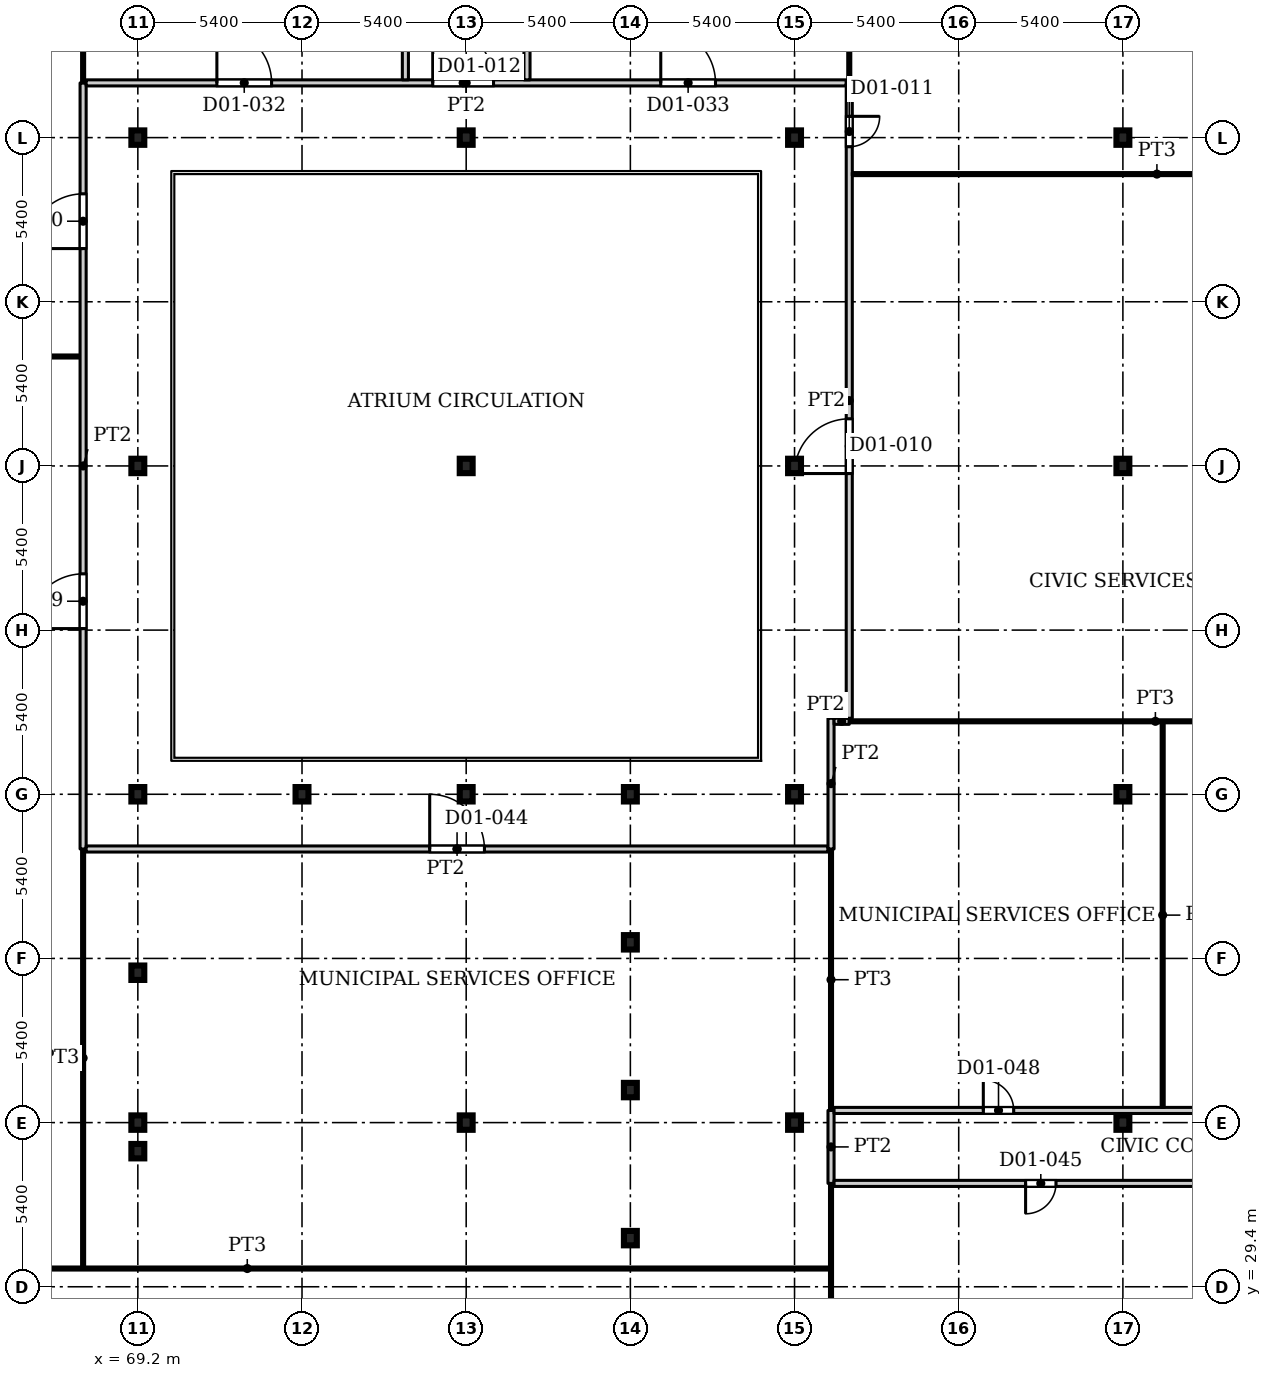
"""IFC4 building model, lengths in metres.
Left out: names, types, materials, properties, quantities, classifications, styles, units other than length and angle.
Written with IfcOpenShell. Run it as: python <this file> out.ifc"""

import sys

from ifc_helpers import new_model, si_unit, direction, frame, frame_2d, origin, origin_2d, place, context, subcontext, project, spatial, rectangle, i_section, extrude, source, transform, mapped, element, fill, save


model = new_model("IFC4")
c1 = context("Model", 3, precision=1e-05, world=origin(), true_north=direction((0.0, 1.0)))
c2 = subcontext(c1, "Body", "Model", "MODEL_VIEW")
j1 = project(units=[si_unit("LENGTHUNIT", "METRE"), si_unit("PLANEANGLEUNIT", "RADIAN")], contexts=[c1])
p1 = place(None, origin())
s1 = spatial("IfcSite", under=j1, at=p1, CompositionType="ELEMENT")
p2 = place(p1, origin())
s2 = spatial("IfcBuilding", under=s1, at=p2, CompositionType="ELEMENT")
p3 = place(p2, frame((0.0, 0.0, 7.5)))
s3 = spatial("IfcBuildingStorey", under=s2, at=p3, CompositionType="ELEMENT", Elevation=7.5)
for number, where, z_axis, x_axis in (
    (1, (69.2, 34.8, 0.0), (0.0, 0.0, 1.0), (1.0, 0.0, 0.0)),
    (2, (80.0, 34.8, 0.0), (0.0, 0.0, 1.0), (1.0, 0.0, 0.0)),
    (3, (90.8, 34.8, 0.0), (0.0, 0.0, 1.0), (1.0, 0.0, 0.0)),
    (4, (101.6, 34.8, 0.0), (0.0, 0.0, 1.0), (1.0, 0.0, 0.0)),
    (5, (69.2, 45.6, 0.0), (0.0, 0.0, 1.0), (1.0, 0.0, 0.0)),
    (6, (80.0, 45.6, 0.0), (0.0, 0.0, 1.0), (1.0, 0.0, 0.0)),
    (7, (90.8, 45.6, 0.0), (0.0, 0.0, 1.0), (1.0, 0.0, 0.0)),
    (8, (101.6, 45.6, 0.0), (0.0, 0.0, 1.0), (1.0, 0.0, 0.0)),
    (9, (69.2, 56.4, 0.0), (0.0, 0.0, 1.0), (1.0, 0.0, 0.0)),
    (10, (80.0, 56.4, 0.0), (0.0, 0.0, 1.0), (1.0, 0.0, 0.0)),
    (11, (90.8, 56.4, 0.0), (0.0, 0.0, 1.0), (1.0, 0.0, 0.0)),
    (12, (101.6, 56.4, 0.0), (0.0, 0.0, 1.0), (1.0, 0.0, 0.0)),
    (13, (69.2, 67.2, 0.0), (0.0, 0.0, 1.0), (1.0, 0.0, 0.0)),
    (14, (80.0, 67.2, 0.0), (0.0, 0.0, 1.0), (1.0, 0.0, 0.0)),
    (15, (90.8, 67.2, 0.0), (0.0, 0.0, 1.0), (1.0, 0.0, 0.0)),
    (16, (101.6, 67.2, 0.0), (0.0, 0.0, 1.0), (1.0, 0.0, 0.0)),
    (17, (74.6, 45.6, 0.0), (0.0, 0.0, 1.0), (1.0, 0.0, 0.0)),
    (18, (85.4, 45.6, 0.0), (0.0, 0.0, 1.0), (1.0, 0.0, 0.0)),
    (19, (85.4, 31.0, 0.0), (0.0, 0.0, 1.0), (1.0, 0.0, 0.0)),
    (20, (69.2, 33.86, 0.0), (0.0, 0.0, 1.0), (1.0, 0.0, 0.0)),
    (21, (85.4, 35.87, 0.0), (0.0, 0.0, 1.0), (1.0, 0.0, 0.0)),
    (22, (69.2, 39.73, 0.0), (0.0, 0.0, 1.0), (1.0, 0.0, 0.0)),
    (23, (85.4, 40.73, 0.0), (0.0, 0.0, 1.0), (1.0, 0.0, 0.0)),
):
    element("IfcColumn", number, at=place(p3, frame(where, z_axis=z_axis, x_axis=x_axis)), inside=s3, PredefinedType="COLUMN", context=c2, shape_type="SweptSolid", body=[
        extrude(i_section(OverallWidth=0.424, OverallDepth=0.474, WebThickness=0.048, FlangeThickness=0.077, FilletRadius=0.014, at=origin_2d()), origin(), (0.0, 0.0, 1.0), 5.0),
    ])
p4 = place(p3, frame((33.45, 60.0, 0.0), z_axis=(0.0, 0.0, 1.0), x_axis=(1.0, 0.0, 0.0)))
e24 = element("IfcWall", 24, at=p4, inside=s3, PredefinedType="PARTITIONING", context=c2, shape_type="SweptSolid", body=[
    extrude(rectangle(XDim=33.85, YDim=0.1, at=frame_2d((16.925, 0.0))), origin(), (0.0, 0.0, 1.0), 4.68),
])
p5 = place(p3, frame((53.649, 30.0, 0.0), z_axis=(0.0, 0.0, 1.0), x_axis=(1.0, 0.0, 0.0)))
e25 = element("IfcWall", 25, at=p5, inside=s3, PredefinedType="PARTITIONING", context=c2, shape_type="SweptSolid", body=[
    extrude(rectangle(XDim=38.301, YDim=0.1, at=frame_2d((19.15, 0.0))), origin(), (0.0, 0.0, 1.0), 4.68),
])
p6 = place(p3, frame((67.4, 30.05, 0.0), z_axis=(0.0, 0.0, 1.0), x_axis=(0.0, 1.0, 0.0)))
e26 = element("IfcWall", 26, at=p6, inside=s3, PredefinedType="PARTITIONING", context=c2, shape_type="SweptSolid", body=[
    extrude(rectangle(XDim=13.75, YDim=0.1, at=frame_2d((6.875, 0.0))), origin(), (0.0, 0.0, 1.0), 4.68),
])
p7 = place(p3, frame((67.4, 43.8, 0.0), z_axis=(0.0, 0.0, 1.0), x_axis=(0.0, 1.0, 0.0)))
e27 = element("IfcWall", 27, at=p7, inside=s3, PredefinedType="PARTITIONING", context=c2, shape_type="SweptSolid", body=[
    extrude(rectangle(XDim=25.2, YDim=0.2, at=frame_2d((12.6, 0.0))), origin(), (0.0, 0.0, 1.0), 4.68),
])
p8 = place(p7, frame((7.25, 0.0, 0.0)))
e28 = element("IfcOpeningElement", 28, at=p8, cuts=e27, PredefinedType="OPENING", context=c2, shape_type="SweptSolid", body=[
    extrude(rectangle(XDim=1.8, YDim=2.1, at=frame_2d((0.9, 1.05))), frame((0.0, 0.11, 0.0), z_axis=(0.0, -1.0, 0.0), x_axis=(1.0, 0.0, 0.0)), (0.0, 0.0, 1.0), 0.22),
])
p9 = place(p7, frame((19.75, 0.0, 0.0)))
e29 = element("IfcOpeningElement", 29, at=p9, cuts=e27, PredefinedType="OPENING", context=c2, shape_type="SweptSolid", body=[
    extrude(rectangle(XDim=1.8, YDim=2.1, at=frame_2d((0.9, 1.05))), frame((0.0, 0.11, 0.0), z_axis=(0.0, -1.0, 0.0), x_axis=(1.0, 0.0, 0.0)), (0.0, 0.0, 1.0), 0.22),
])
p10 = place(p3, frame((67.4, 69.0, 0.0), z_axis=(0.0, 0.0, 1.0), x_axis=(0.0, 1.0, 0.0)))
e30 = element("IfcWall", 30, at=p10, inside=s3, PredefinedType="PARTITIONING", context=c2, shape_type="SweptSolid", body=[
    extrude(rectangle(XDim=21.738, YDim=0.1, at=frame_2d((10.869, 0.0))), origin(), (0.0, 0.0, 1.0), 4.68),
])
p11 = place(p3, frame((67.5, 43.8, 0.0), z_axis=(0.0, 0.0, 1.0), x_axis=(1.0, 0.0, 0.0)))
e31 = element("IfcWall", 31, at=p11, inside=s3, PredefinedType="PARTITIONING", context=c2, shape_type="SweptSolid", body=[
    extrude(rectangle(XDim=24.4, YDim=0.2, at=frame_2d((12.2, 0.0))), origin(), (0.0, 0.0, 1.0), 4.68),
])
p12 = place(p11, frame((11.3, 0.0, 0.0)))
e32 = element("IfcOpeningElement", 32, at=p12, cuts=e31, PredefinedType="OPENING", context=c2, shape_type="SweptSolid", body=[
    extrude(rectangle(XDim=1.8, YDim=2.1, at=frame_2d((0.9, 1.05))), frame((0.0, 0.11, 0.0), z_axis=(0.0, -1.0, 0.0), x_axis=(1.0, 0.0, 0.0)), (0.0, 0.0, 1.0), 0.22),
])
p13 = place(p3, frame((67.5, 69.0, 0.0), z_axis=(0.0, 0.0, 1.0), x_axis=(1.0, 0.0, 0.0)))
e33 = element("IfcWall", 33, at=p13, inside=s3, PredefinedType="PARTITIONING", context=c2, shape_type="SweptSolid", body=[
    extrude(rectangle(XDim=25.0, YDim=0.2, at=frame_2d((12.5, 0.0))), origin(), (0.0, 0.0, 1.0), 4.68),
])
p14 = place(p13, frame((11.4, 0.0, 0.0)))
e34 = element("IfcOpeningElement", 34, at=p14, cuts=e33, PredefinedType="OPENING", context=c2, shape_type="SweptSolid", body=[
    extrude(rectangle(XDim=2.0, YDim=2.1, at=frame_2d((1.0, 1.05))), frame((0.0, 0.11, 0.0), z_axis=(0.0, -1.0, 0.0), x_axis=(1.0, 0.0, 0.0)), (0.0, 0.0, 1.0), 0.22),
])
p15 = place(p13, frame((4.3, 0.0, 0.0)))
e35 = element("IfcOpeningElement", 35, at=p15, cuts=e33, PredefinedType="OPENING", context=c2, shape_type="SweptSolid", body=[
    extrude(rectangle(XDim=1.8, YDim=2.1, at=frame_2d((0.9, 1.05))), frame((0.0, 0.11, 0.0), z_axis=(0.0, -1.0, 0.0), x_axis=(1.0, 0.0, 0.0)), (0.0, 0.0, 1.0), 0.22),
])
p16 = place(p13, frame((18.9, 0.0, 0.0)))
e36 = element("IfcOpeningElement", 36, at=p16, cuts=e33, PredefinedType="OPENING", context=c2, shape_type="SweptSolid", body=[
    extrude(rectangle(XDim=1.8, YDim=2.1, at=frame_2d((0.9, 1.05))), frame((0.0, 0.11, 0.0), z_axis=(0.0, -1.0, 0.0), x_axis=(1.0, 0.0, 0.0)), (0.0, 0.0, 1.0), 0.22),
])
for number, where, z_axis, x_axis in (
    (37, (78.0, 69.1, 0.0), (0.0, 0.0, 1.0), (0.0, 1.0, 0.0)),
    (38, (82.0, 69.1, 0.0), (0.0, 0.0, 1.0), (0.0, 1.0, 0.0)),
):
    element("IfcWall", number, at=place(p3, frame(where, z_axis=z_axis, x_axis=x_axis)), inside=s3, PredefinedType="PARTITIONING", context=c2, shape_type="SweptSolid", body=[
        extrude(rectangle(XDim=21.6, YDim=0.2, at=frame_2d((10.8, 0.0))), origin(), (0.0, 0.0, 1.0), 4.68),
    ])
p17 = place(p3, frame((92.0, 22.05, 0.0), z_axis=(0.0, 0.0, 1.0), x_axis=(0.0, 1.0, 0.0)))
e39 = element("IfcWall", 39, at=p17, inside=s3, PredefinedType="PARTITIONING", context=c2, shape_type="SweptSolid", body=[
    extrude(rectangle(XDim=10.75, YDim=0.1, at=frame_2d((5.375, 0.0))), origin(), (0.0, 0.0, 1.0), 4.68),
])
p18 = place(p3, frame((92.0, 32.8, 0.0), z_axis=(0.0, 0.0, 1.0), x_axis=(0.0, 1.0, 0.0)))
e40 = element("IfcWall", 40, at=p18, inside=s3, PredefinedType="PARTITIONING", context=c2, shape_type="SweptSolid", body=[
    extrude(rectangle(XDim=2.4, YDim=0.2, at=frame_2d((1.2, 0.0))), origin(), (0.0, 0.0, 1.0), 4.68),
])
p19 = place(p3, frame((92.0, 35.2, 0.0), z_axis=(0.0, 0.0, 1.0), x_axis=(0.0, 1.0, 0.0)))
e41 = element("IfcWall", 41, at=p19, inside=s3, PredefinedType="PARTITIONING", context=c2, shape_type="SweptSolid", body=[
    extrude(rectangle(XDim=8.6, YDim=0.1, at=frame_2d((4.3, 0.0))), origin(), (0.0, 0.0, 1.0), 4.68),
])
p20 = place(p3, frame((92.0, 43.8, 0.0), z_axis=(0.0, 0.0, 1.0), x_axis=(0.0, 1.0, 0.0)))
e42 = element("IfcWall", 42, at=p20, inside=s3, PredefinedType="PARTITIONING", context=c2, shape_type="SweptSolid", body=[
    extrude(rectangle(XDim=4.3, YDim=0.2, at=frame_2d((2.15, 0.0))), origin(), (0.0, 0.0, 1.0), 4.68),
])
p21 = place(p3, frame((92.1, 32.8, 0.0), z_axis=(0.0, 0.0, 1.0), x_axis=(1.0, 0.0, 0.0)))
e43 = element("IfcWall", 43, at=p21, inside=s3, PredefinedType="PARTITIONING", context=c2, shape_type="SweptSolid", body=[
    extrude(rectangle(XDim=32.881, YDim=0.2, at=frame_2d((16.44, 0.0))), origin(), (0.0, 0.0, 1.0), 4.68),
])
p22 = place(p21, frame((6.3, 0.0, 0.0)))
e44 = element("IfcOpeningElement", 44, at=p22, cuts=e43, PredefinedType="OPENING", context=c2, shape_type="SweptSolid", body=[
    extrude(rectangle(XDim=1.0, YDim=2.1, at=frame_2d((0.5, 1.05))), frame((0.0, 0.11, 0.0), z_axis=(0.0, -1.0, 0.0), x_axis=(1.0, 0.0, 0.0)), (0.0, 0.0, 1.0), 0.22),
])
p23 = place(p21, frame((19.3, 0.0, 0.0)))
e45 = element("IfcOpeningElement", 45, at=p23, cuts=e43, PredefinedType="OPENING", context=c2, shape_type="SweptSolid", body=[
    extrude(rectangle(XDim=1.0, YDim=2.1, at=frame_2d((0.5, 1.05))), frame((0.0, 0.11, 0.0), z_axis=(0.0, -1.0, 0.0), x_axis=(1.0, 0.0, 0.0)), (0.0, 0.0, 1.0), 0.22),
])
p24 = place(p21, frame((29.05, 0.0, 0.0)))
e46 = element("IfcOpeningElement", 46, at=p24, cuts=e43, PredefinedType="OPENING", context=c2, shape_type="SweptSolid", body=[
    extrude(rectangle(XDim=1.0, YDim=2.1, at=frame_2d((0.5, 1.05))), frame((0.0, 0.11, 0.0), z_axis=(0.0, -1.0, 0.0), x_axis=(1.0, 0.0, 0.0)), (0.0, 0.0, 1.0), 0.22),
])
p25 = place(p3, frame((92.1, 35.2, 0.0), z_axis=(0.0, 0.0, 1.0), x_axis=(1.0, 0.0, 0.0)))
e47 = element("IfcWall", 47, at=p25, inside=s3, PredefinedType="PARTITIONING", context=c2, shape_type="SweptSolid", body=[
    extrude(rectangle(XDim=32.88, YDim=0.2, at=frame_2d((16.44, 0.0))), origin(), (0.0, 0.0, 1.0), 4.68),
])
p26 = place(p25, frame((4.909, 0.0, 0.0)))
e48 = element("IfcOpeningElement", 48, at=p26, cuts=e47, PredefinedType="OPENING", context=c2, shape_type="SweptSolid", body=[
    extrude(rectangle(XDim=1.0, YDim=2.1, at=frame_2d((0.5, 1.05))), frame((0.0, 0.11, 0.0), z_axis=(0.0, -1.0, 0.0), x_axis=(1.0, 0.0, 0.0)), (0.0, 0.0, 1.0), 0.22),
])
p27 = place(p25, frame((13.932, 0.0, 0.0)))
e49 = element("IfcOpeningElement", 49, at=p27, cuts=e47, PredefinedType="OPENING", context=c2, shape_type="SweptSolid", body=[
    extrude(rectangle(XDim=1.0, YDim=2.1, at=frame_2d((0.5, 1.05))), frame((0.0, 0.11, 0.0), z_axis=(0.0, -1.0, 0.0), x_axis=(1.0, 0.0, 0.0)), (0.0, 0.0, 1.0), 0.22),
])
p28 = place(p25, frame((23.091, 0.0, 0.0)))
e50 = element("IfcOpeningElement", 50, at=p28, cuts=e47, PredefinedType="OPENING", context=c2, shape_type="SweptSolid", body=[
    extrude(rectangle(XDim=1.0, YDim=2.1, at=frame_2d((0.5, 1.05))), frame((0.0, 0.11, 0.0), z_axis=(0.0, -1.0, 0.0), x_axis=(1.0, 0.0, 0.0)), (0.0, 0.0, 1.0), 0.22),
])
p29 = place(p25, frame((29.477, 0.0, 0.0)))
e51 = element("IfcOpeningElement", 51, at=p29, cuts=e47, PredefinedType="OPENING", context=c2, shape_type="SweptSolid", body=[
    extrude(rectangle(XDim=1.0, YDim=2.1, at=frame_2d((0.5, 1.05))), frame((0.0, 0.11, 0.0), z_axis=(0.0, -1.0, 0.0), x_axis=(1.0, 0.0, 0.0)), (0.0, 0.0, 1.0), 0.22),
])
p30 = place(p3, frame((92.1, 48.0, 0.0), z_axis=(0.0, 0.0, 1.0), x_axis=(1.0, 0.0, 0.0)))
e52 = element("IfcWall", 52, at=p30, inside=s3, PredefinedType="PARTITIONING", context=c2, shape_type="SweptSolid", body=[
    extrude(rectangle(XDim=0.5, YDim=0.2, at=frame_2d((0.25, 0.0))), origin(), (0.0, 0.0, 1.0), 4.68),
])
p31 = place(p3, frame((92.6, 48.0, 0.0), z_axis=(0.0, 0.0, 1.0), x_axis=(1.0, 0.0, 0.0)))
e53 = element("IfcWall", 53, at=p31, inside=s3, PredefinedType="PARTITIONING", context=c2, shape_type="SweptSolid", body=[
    extrude(rectangle(XDim=20.138, YDim=0.1, at=frame_2d((10.069, 0.0))), origin(), (0.0, 0.0, 1.0), 4.68),
])
p32 = place(p3, frame((92.6, 48.1, 0.0), z_axis=(0.0, 0.0, 1.0), x_axis=(0.0, 1.0, 0.0)))
e54 = element("IfcWall", 54, at=p32, inside=s3, PredefinedType="PARTITIONING", context=c2, shape_type="SweptSolid", body=[
    extrude(rectangle(XDim=20.9, YDim=0.2, at=frame_2d((10.45, 0.0))), origin(), (0.0, 0.0, 1.0), 4.68),
])
p33 = place(p32, frame((8.05, 0.0, 0.0)))
e55 = element("IfcOpeningElement", 55, at=p33, cuts=e54, PredefinedType="OPENING", context=c2, shape_type="SweptSolid", body=[
    extrude(rectangle(XDim=1.8, YDim=2.1, at=frame_2d((0.9, 1.05))), frame((0.0, 0.11, 0.0), z_axis=(0.0, -1.0, 0.0), x_axis=(1.0, 0.0, 0.0)), (0.0, 0.0, 1.0), 0.22),
])
p34 = place(p32, frame((18.8, 0.0, 0.0)))
e56 = element("IfcOpeningElement", 56, at=p34, cuts=e54, PredefinedType="OPENING", context=c2, shape_type="SweptSolid", body=[
    extrude(rectangle(XDim=1.0, YDim=2.1, at=frame_2d((0.5, 1.05))), frame((0.0, 0.11, 0.0), z_axis=(0.0, -1.0, 0.0), x_axis=(1.0, 0.0, 0.0)), (0.0, 0.0, 1.0), 0.22),
])
p35 = place(p3, frame((92.6, 69.0, 0.0), z_axis=(0.0, 0.0, 1.0), x_axis=(0.0, 1.0, 0.0)))
e57 = element("IfcWall", 57, at=p35, inside=s3, PredefinedType="PARTITIONING", context=c2, shape_type="SweptSolid", body=[
    extrude(rectangle(XDim=21.738, YDim=0.1, at=frame_2d((10.869, 0.0))), origin(), (0.0, 0.0, 1.0), 4.68),
])
p36 = place(p3, frame((92.7, 66.0, 0.0), z_axis=(0.0, 0.0, 1.0), x_axis=(1.0, 0.0, 0.0)))
e58 = element("IfcWall", 58, at=p36, inside=s3, PredefinedType="PARTITIONING", context=c2, shape_type="SweptSolid", body=[
    extrude(rectangle(XDim=20.038, YDim=0.1, at=frame_2d((10.019, 0.0))), origin(), (0.0, 0.0, 1.0), 4.68),
])
p37 = place(p3, frame((102.909, 35.3, 0.0), z_axis=(0.0, 0.0, 1.0), x_axis=(0.0, 1.0, 0.0)))
e59 = element("IfcWall", 59, at=p37, inside=s3, PredefinedType="PARTITIONING", context=c2, shape_type="SweptSolid", body=[
    extrude(rectangle(XDim=12.65, YDim=0.1, at=frame_2d((6.325, 0.0))), origin(), (0.0, 0.0, 1.0), 4.68),
])
m1 = source(origin(), c2, "Body", "SweptSolid", [
    extrude(rectangle(XDim=1.8, YDim=2.1, at=frame_2d((0.9, 1.05))), frame((0.0, 0.025, 0.0), z_axis=(0.0, -1.0, 0.0), x_axis=(1.0, 0.0, 0.0)), (0.0, 0.0, 1.0), 0.05),
])
p38 = place(p33, origin())
e60 = element("IfcDoor", 60, at=p38, inside=s3, OperationType="DOUBLE_DOOR_SINGLE_SWING", PredefinedType="DOOR", context=c2, shape_type="MappedRepresentation", body=[
    mapped(m1, transform((0.0, 0.0, 0.0), x_axis=(1.0, 0.0, 0.0), y_axis=(0.0, 1.0, 0.0), z_axis=(0.0, 0.0, 1.0), scale=1.0)),
])
fill(e55, e60)
m2 = source(origin(), c2, "Body", "SweptSolid", [
    extrude(rectangle(XDim=1.0, YDim=2.1, at=frame_2d((0.5, 1.05))), frame((0.0, 0.025, 0.0), z_axis=(0.0, -1.0, 0.0), x_axis=(1.0, 0.0, 0.0)), (0.0, 0.0, 1.0), 0.05),
])
p39 = place(p34, origin())
e61 = element("IfcDoor", 61, at=p39, inside=s3, OperationType="SINGLE_SWING_RIGHT", PredefinedType="DOOR", context=c2, shape_type="MappedRepresentation", body=[
    mapped(m2, transform((0.0, 0.0, 0.0), x_axis=(1.0, 0.0, 0.0), y_axis=(0.0, 1.0, 0.0), z_axis=(0.0, 0.0, 1.0), scale=1.0)),
])
fill(e56, e61)
m3 = source(origin(), c2, "Body", "SweptSolid", [
    extrude(rectangle(XDim=2.0, YDim=2.1, at=frame_2d((1.0, 1.05))), frame((0.0, 0.025, 0.0), z_axis=(0.0, -1.0, 0.0), x_axis=(1.0, 0.0, 0.0)), (0.0, 0.0, 1.0), 0.05),
])
p40 = place(p14, origin())
e62 = element("IfcDoor", 62, at=p40, inside=s3, OperationType="DOUBLE_DOOR_SINGLE_SWING", PredefinedType="DOOR", context=c2, shape_type="MappedRepresentation", body=[
    mapped(m3, transform((0.0, 0.0, 0.0), x_axis=(1.0, 0.0, 0.0), y_axis=(0.0, 1.0, 0.0), z_axis=(0.0, 0.0, 1.0), scale=1.0)),
])
fill(e34, e62)
p41 = place(p15, origin())
e63 = element("IfcDoor", 63, at=p41, inside=s3, OperationType="DOUBLE_DOOR_SINGLE_SWING", PredefinedType="DOOR", context=c2, shape_type="MappedRepresentation", body=[
    mapped(m1, transform((0.0, 0.0, 0.0), x_axis=(1.0, 0.0, 0.0), y_axis=(0.0, 1.0, 0.0), z_axis=(0.0, 0.0, 1.0), scale=1.0)),
])
fill(e35, e63)
p42 = place(p16, origin())
e64 = element("IfcDoor", 64, at=p42, inside=s3, OperationType="DOUBLE_DOOR_SINGLE_SWING", PredefinedType="DOOR", context=c2, shape_type="MappedRepresentation", body=[
    mapped(m1, transform((0.0, 0.0, 0.0), x_axis=(1.0, 0.0, 0.0), y_axis=(0.0, 1.0, 0.0), z_axis=(0.0, 0.0, 1.0), scale=1.0)),
])
fill(e36, e64)
p43 = place(p12, origin())
e65 = element("IfcDoor", 65, at=p43, inside=s3, OperationType="DOUBLE_DOOR_SINGLE_SWING", PredefinedType="DOOR", context=c2, shape_type="MappedRepresentation", body=[
    mapped(m1, transform((0.0, 0.0, 0.0), x_axis=(1.0, 0.0, 0.0), y_axis=(0.0, 1.0, 0.0), z_axis=(0.0, 0.0, 1.0), scale=1.0)),
])
fill(e32, e65)
p44 = place(p22, origin())
e66 = element("IfcDoor", 66, at=p44, inside=s3, OperationType="SINGLE_SWING_RIGHT", PredefinedType="DOOR", context=c2, shape_type="MappedRepresentation", body=[
    mapped(m2, transform((0.0, 0.0, 0.0), x_axis=(1.0, 0.0, 0.0), y_axis=(0.0, 1.0, 0.0), z_axis=(0.0, 0.0, 1.0), scale=1.0)),
])
fill(e44, e66)
p45 = place(p26, origin())
e67 = element("IfcDoor", 67, at=p45, inside=s3, OperationType="SINGLE_SWING_LEFT", PredefinedType="DOOR", context=c2, shape_type="MappedRepresentation", body=[
    mapped(m2, transform((0.0, 0.0, 0.0), x_axis=(1.0, 0.0, 0.0), y_axis=(0.0, 1.0, 0.0), z_axis=(0.0, 0.0, 1.0), scale=1.0)),
])
fill(e48, e67)
p46 = place(p8, origin())
e68 = element("IfcDoor", 68, at=p46, inside=s3, OperationType="DOUBLE_DOOR_SINGLE_SWING", PredefinedType="DOOR", context=c2, shape_type="MappedRepresentation", body=[
    mapped(m1, transform((0.0, 0.0, 0.0), x_axis=(1.0, 0.0, 0.0), y_axis=(0.0, 1.0, 0.0), z_axis=(0.0, 0.0, 1.0), scale=1.0)),
])
fill(e28, e68)
p47 = place(p9, origin())
e69 = element("IfcDoor", 69, at=p47, inside=s3, OperationType="DOUBLE_DOOR_SINGLE_SWING", PredefinedType="DOOR", context=c2, shape_type="MappedRepresentation", body=[
    mapped(m1, transform((0.0, 0.0, 0.0), x_axis=(1.0, 0.0, 0.0), y_axis=(0.0, 1.0, 0.0), z_axis=(0.0, 0.0, 1.0), scale=1.0)),
])
fill(e29, e69)
save(model, sys.argv[1])
